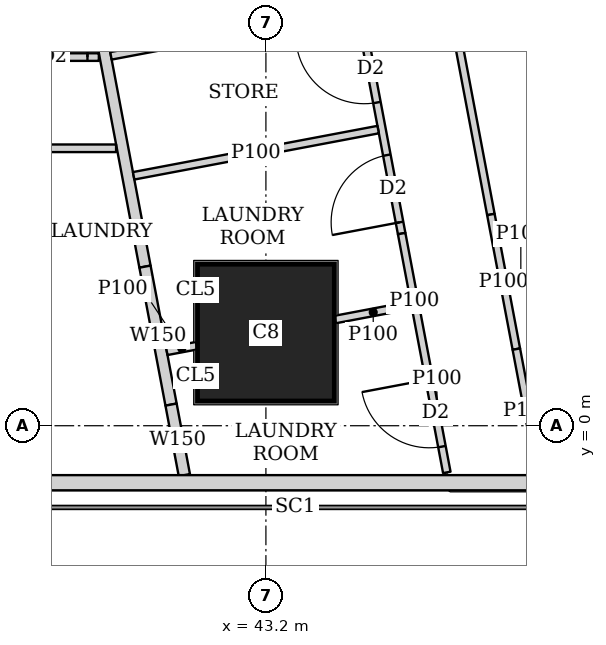
"""IFC4 building model, lengths in metres.
Left out: names, types, materials, properties, quantities, classifications, styles, units other than length and angle.
Written with IfcOpenShell. Run it as: python <this file> out.ifc"""

import sys

from ifc_helpers import new_model, si_unit, direction, frame, frame_2d, origin, origin_2d, place, context, subcontext, project, spatial, rectangle, extrude, element, fill, save


model = new_model("IFC4")
c1 = context("Model", 3, precision=1e-05, world=origin(), true_north=direction((0.0, 1.0)))
c2 = subcontext(c1, "Body", "Model", "MODEL_VIEW")
j1 = project(units=[si_unit("LENGTHUNIT", "METRE"), si_unit("PLANEANGLEUNIT", "RADIAN")], contexts=[c1])
p1 = place(None, origin())
s1 = spatial("IfcSite", under=j1, at=p1, CompositionType="ELEMENT")
p2 = place(p1, origin())
s2 = spatial("IfcBuilding", under=s1, at=p2, CompositionType="ELEMENT")
p3 = place(p2, frame((0.0, 0.0, 147.05)))
s3 = spatial("IfcBuildingStorey", under=s2, at=p3, CompositionType="ELEMENT", Elevation=147.05)
p4 = place(p3, frame((43.2, 1.225, 0.0), z_axis=(0.0, 0.0, 1.0), x_axis=(1.0, 0.0, 0.0)))
e1 = element("IfcColumn", 1, at=p4, inside=s3, PredefinedType="COLUMN", context=c2, shape_type="SweptSolid", body=[
    extrude(rectangle(XDim=1.8, YDim=1.8, at=origin_2d()), origin(), (0.0, 0.0, 1.0), 3.75),
])
p5 = place(p3, frame((2.163, -0.75, 0.0), z_axis=(0.0, 0.0, 1.0), x_axis=(1.0, 0.0, 0.0)))
e2 = element("IfcWall", 2, at=p5, inside=s3, PredefinedType="SOLIDWALL", context=c2, shape_type="SweptSolid", body=[
    extrude(rectangle(XDim=45.628, YDim=0.2, at=frame_2d((22.814, 0.0))), origin(), (0.0, 0.0, 1.0), 3.5),
])
p6 = place(p5, frame((9.537, 0.0, 0.9)))
e3 = element("IfcOpeningElement", 3, at=p6, cuts=e2, PredefinedType="OPENING", context=c2, shape_type="SweptSolid", body=[
    extrude(rectangle(XDim=1.8, YDim=1.5, at=frame_2d((0.9, 0.75))), frame((0.0, 0.11, 0.0), z_axis=(0.0, -1.0, 0.0), x_axis=(1.0, 0.0, 0.0)), (0.0, 0.0, 1.0), 0.22),
])
p7 = place(p5, frame((13.137, 0.0, 0.9)))
e4 = element("IfcOpeningElement", 4, at=p7, cuts=e2, PredefinedType="OPENING", context=c2, shape_type="SweptSolid", body=[
    extrude(rectangle(XDim=1.8, YDim=1.5, at=frame_2d((0.9, 0.75))), frame((0.0, 0.11, 0.0), z_axis=(0.0, -1.0, 0.0), x_axis=(1.0, 0.0, 0.0)), (0.0, 0.0, 1.0), 0.22),
])
p8 = place(p5, frame((16.737, 0.0, 0.9)))
e5 = element("IfcOpeningElement", 5, at=p8, cuts=e2, PredefinedType="OPENING", context=c2, shape_type="SweptSolid", body=[
    extrude(rectangle(XDim=1.8, YDim=1.5, at=frame_2d((0.9, 0.75))), frame((0.0, 0.11, 0.0), z_axis=(0.0, -1.0, 0.0), x_axis=(1.0, 0.0, 0.0)), (0.0, 0.0, 1.0), 0.22),
])
p9 = place(p5, frame((20.337, 0.0, 0.9)))
e6 = element("IfcOpeningElement", 6, at=p9, cuts=e2, PredefinedType="OPENING", context=c2, shape_type="SweptSolid", body=[
    extrude(rectangle(XDim=1.8, YDim=1.5, at=frame_2d((0.9, 0.75))), frame((0.0, 0.11, 0.0), z_axis=(0.0, -1.0, 0.0), x_axis=(1.0, 0.0, 0.0)), (0.0, 0.0, 1.0), 0.22),
])
p10 = place(p5, frame((23.937, 0.0, 0.9)))
e7 = element("IfcOpeningElement", 7, at=p10, cuts=e2, PredefinedType="OPENING", context=c2, shape_type="SweptSolid", body=[
    extrude(rectangle(XDim=1.8, YDim=1.5, at=frame_2d((0.9, 0.75))), frame((0.0, 0.11, 0.0), z_axis=(0.0, -1.0, 0.0), x_axis=(1.0, 0.0, 0.0)), (0.0, 0.0, 1.0), 0.22),
])
p11 = place(p5, frame((27.537, 0.0, 0.9)))
e8 = element("IfcOpeningElement", 8, at=p11, cuts=e2, PredefinedType="OPENING", context=c2, shape_type="SweptSolid", body=[
    extrude(rectangle(XDim=1.8, YDim=1.5, at=frame_2d((0.9, 0.75))), frame((0.0, 0.11, 0.0), z_axis=(0.0, -1.0, 0.0), x_axis=(1.0, 0.0, 0.0)), (0.0, 0.0, 1.0), 0.22),
])
p12 = place(p5, frame((31.137, 0.0, 0.9)))
e9 = element("IfcOpeningElement", 9, at=p12, cuts=e2, PredefinedType="OPENING", context=c2, shape_type="SweptSolid", body=[
    extrude(rectangle(XDim=1.8, YDim=1.5, at=frame_2d((0.9, 0.75))), frame((0.0, 0.11, 0.0), z_axis=(0.0, -1.0, 0.0), x_axis=(1.0, 0.0, 0.0)), (0.0, 0.0, 1.0), 0.22),
])
p13 = place(p5, frame((34.737, 0.0, 0.9)))
e10 = element("IfcOpeningElement", 10, at=p13, cuts=e2, PredefinedType="OPENING", context=c2, shape_type="SweptSolid", body=[
    extrude(rectangle(XDim=1.8, YDim=1.5, at=frame_2d((0.9, 0.75))), frame((0.0, 0.11, 0.0), z_axis=(0.0, -1.0, 0.0), x_axis=(1.0, 0.0, 0.0)), (0.0, 0.0, 1.0), 0.22),
])
p14 = place(p3, frame((50.653, 2.703, 0.0), z_axis=(0.0, 0.0, 1.0), x_axis=(-0.185612026696, 0.982623109613, 0.0)))
e11 = element("IfcWall", 11, at=p14, inside=s3, PredefinedType="SOLIDWALL", context=c2, shape_type="SweptSolid", body=[
    extrude(rectangle(XDim=41.393, YDim=0.2, at=frame_2d((20.697, 0.0))), origin(), (0.0, 0.0, 1.0), 3.5),
])
p15 = place(p14, frame((1.633, 0.0, 0.9)))
e12 = element("IfcOpeningElement", 12, at=p15, cuts=e11, PredefinedType="OPENING", context=c2, shape_type="SweptSolid", body=[
    extrude(rectangle(XDim=1.8, YDim=1.5, at=frame_2d((0.9, 0.75))), frame((0.0, 0.11, 0.0), z_axis=(0.0, -1.0, 0.0), x_axis=(1.0, 0.0, 0.0)), (0.0, 0.0, 1.0), 0.22),
])
p16 = place(p14, frame((6.032, 0.0, 0.9)))
e13 = element("IfcOpeningElement", 13, at=p16, cuts=e11, PredefinedType="OPENING", context=c2, shape_type="SweptSolid", body=[
    extrude(rectangle(XDim=1.8, YDim=1.5, at=frame_2d((0.9, 0.75))), frame((0.0, 0.11, 0.0), z_axis=(0.0, -1.0, 0.0), x_axis=(1.0, 0.0, 0.0)), (0.0, 0.0, 1.0), 0.22),
])
p17 = place(p14, frame((9.848, 0.0, 0.9)))
e14 = element("IfcOpeningElement", 14, at=p17, cuts=e11, PredefinedType="OPENING", context=c2, shape_type="SweptSolid", body=[
    extrude(rectangle(XDim=1.8, YDim=1.5, at=frame_2d((0.9, 0.75))), frame((0.0, 0.11, 0.0), z_axis=(0.0, -1.0, 0.0), x_axis=(1.0, 0.0, 0.0)), (0.0, 0.0, 1.0), 0.22),
])
p18 = place(p14, frame((13.664, 0.0, 0.9)))
e15 = element("IfcOpeningElement", 15, at=p18, cuts=e11, PredefinedType="OPENING", context=c2, shape_type="SweptSolid", body=[
    extrude(rectangle(XDim=1.8, YDim=1.5, at=frame_2d((0.9, 0.75))), frame((0.0, 0.11, 0.0), z_axis=(0.0, -1.0, 0.0), x_axis=(1.0, 0.0, 0.0)), (0.0, 0.0, 1.0), 0.22),
])
p19 = place(p14, frame((17.481, 0.0, 0.9)))
e16 = element("IfcOpeningElement", 16, at=p19, cuts=e11, PredefinedType="OPENING", context=c2, shape_type="SweptSolid", body=[
    extrude(rectangle(XDim=1.8, YDim=1.5, at=frame_2d((0.9, 0.75))), frame((0.0, 0.11, 0.0), z_axis=(0.0, -1.0, 0.0), x_axis=(1.0, 0.0, 0.0)), (0.0, 0.0, 1.0), 0.22),
])
p20 = place(p14, frame((21.297, 0.0, 0.9)))
e17 = element("IfcOpeningElement", 17, at=p20, cuts=e11, PredefinedType="OPENING", context=c2, shape_type="SweptSolid", body=[
    extrude(rectangle(XDim=1.8, YDim=1.5, at=frame_2d((0.9, 0.75))), frame((0.0, 0.11, 0.0), z_axis=(0.0, -1.0, 0.0), x_axis=(1.0, 0.0, 0.0)), (0.0, 0.0, 1.0), 0.22),
])
p21 = place(p14, frame((25.113, 0.0, 0.9)))
e18 = element("IfcOpeningElement", 18, at=p21, cuts=e11, PredefinedType="OPENING", context=c2, shape_type="SweptSolid", body=[
    extrude(rectangle(XDim=1.8, YDim=1.5, at=frame_2d((0.9, 0.75))), frame((0.0, 0.11, 0.0), z_axis=(0.0, -1.0, 0.0), x_axis=(1.0, 0.0, 0.0)), (0.0, 0.0, 1.0), 0.22),
])
p22 = place(p14, frame((28.93, 0.0, 0.9)))
e19 = element("IfcOpeningElement", 19, at=p22, cuts=e11, PredefinedType="OPENING", context=c2, shape_type="SweptSolid", body=[
    extrude(rectangle(XDim=1.8, YDim=1.5, at=frame_2d((0.9, 0.75))), frame((0.0, 0.11, 0.0), z_axis=(0.0, -1.0, 0.0), x_axis=(1.0, 0.0, 0.0)), (0.0, 0.0, 1.0), 0.22),
])
p23 = place(p14, frame((32.746, 0.0, 0.9)))
e20 = element("IfcOpeningElement", 20, at=p23, cuts=e11, PredefinedType="OPENING", context=c2, shape_type="SweptSolid", body=[
    extrude(rectangle(XDim=1.8, YDim=1.5, at=frame_2d((0.9, 0.75))), frame((0.0, 0.11, 0.0), z_axis=(0.0, -1.0, 0.0), x_axis=(1.0, 0.0, 0.0)), (0.0, 0.0, 1.0), 0.22),
])
p24 = place(p14, frame((36.481, 0.0, 0.9)))
e21 = element("IfcOpeningElement", 21, at=p24, cuts=e11, PredefinedType="OPENING", context=c2, shape_type="SweptSolid", body=[
    extrude(rectangle(XDim=1.8, YDim=1.5, at=frame_2d((0.9, 0.75))), frame((0.0, 0.11, 0.0), z_axis=(0.0, -1.0, 0.0), x_axis=(1.0, 0.0, 0.0)), (0.0, 0.0, 1.0), 0.22),
])
p25 = place(p3, frame((33.877, 43.029, 0.0), z_axis=(0.0, 0.0, 1.0), x_axis=(0.185596841028, -0.98262597798, 0.0)))
e22 = element("IfcWall", 22, at=p25, inside=s3, PredefinedType="SOLIDWALL", context=c2, shape_type="SweptSolid", body=[
    extrude(rectangle(XDim=41.66, YDim=0.15, at=frame_2d((20.83, 0.0))), origin(), (0.0, 0.0, 1.0), 2.5),
])
p26 = place(p25, frame((12.57, 0.0, 0.0)))
e23 = element("IfcOpeningElement", 23, at=p26, cuts=e22, PredefinedType="OPENING", context=c2, shape_type="SweptSolid", body=[
    extrude(rectangle(XDim=1.0, YDim=2.1, at=frame_2d((0.5, 1.05))), frame((0.0, 0.085, 0.0), z_axis=(0.0, -1.0, 0.0), x_axis=(1.0, 0.0, 0.0)), (0.0, 0.0, 1.0), 0.17),
])
p27 = place(p25, frame((16.386, 0.0, 0.0)))
e24 = element("IfcOpeningElement", 24, at=p27, cuts=e22, PredefinedType="OPENING", context=c2, shape_type="SweptSolid", body=[
    extrude(rectangle(XDim=1.0, YDim=2.1, at=frame_2d((0.5, 1.05))), frame((0.0, 0.085, 0.0), z_axis=(0.0, -1.0, 0.0), x_axis=(1.0, 0.0, 0.0)), (0.0, 0.0, 1.0), 0.17),
])
p28 = place(p25, frame((31.166, 0.0, 0.0)))
e25 = element("IfcOpeningElement", 25, at=p28, cuts=e22, PredefinedType="OPENING", context=c2, shape_type="SweptSolid", body=[
    extrude(rectangle(XDim=1.0, YDim=2.1, at=frame_2d((0.5, 1.05))), frame((0.0, 0.085, 0.0), z_axis=(0.0, -1.0, 0.0), x_axis=(1.0, 0.0, 0.0)), (0.0, 0.0, 1.0), 0.17),
])
p29 = place(p3, frame((41.609, 2.093, 0.0), z_axis=(0.0, 0.0, 1.0), x_axis=(0.185708872674, -0.982604811005, 0.0)))
e26 = element("IfcWall", 26, at=p29, inside=s3, PredefinedType="SOLIDWALL", context=c2, shape_type="SweptSolid", body=[
    extrude(rectangle(XDim=1.847, YDim=0.15, at=frame_2d((0.924, 0.0))), origin(), (0.0, 0.0, 1.0), 2.1),
])
p30 = place(p3, frame((41.952, 0.278, 0.0), z_axis=(0.0, 0.0, 1.0), x_axis=(0.185365466984, -0.982669651332, 0.0)))
e27 = element("IfcWall", 27, at=p30, inside=s3, PredefinedType="SOLIDWALL", context=c2, shape_type="SweptSolid", body=[
    extrude(rectangle(XDim=0.944, YDim=0.15, at=frame_2d((0.472, 0.0))), origin(), (0.0, 0.0, 1.0), 3.5),
])
p31 = place(p3, frame((41.229, 3.65, 0.0), z_axis=(0.0, 0.0, 1.0), x_axis=(-1.0, 0.0, 0.0)))
e28 = element("IfcWall", 28, at=p31, inside=s3, PredefinedType="PARTITIONING", context=c2, shape_type="SweptSolid", body=[
    extrude(rectangle(XDim=12.429, YDim=0.1, at=frame_2d((6.214, 0.0))), origin(), (0.0, 0.0, 1.0), 3.5),
])
p32 = place(p31, frame((11.329, 0.0, 0.0)))
e29 = element("IfcOpeningElement", 29, at=p32, cuts=e28, PredefinedType="OPENING", context=c2, shape_type="SweptSolid", body=[
    extrude(rectangle(XDim=0.9, YDim=2.1, at=frame_2d((0.45, 1.05))), frame((0.0, 0.06, 0.0), z_axis=(0.0, -1.0, 0.0), x_axis=(1.0, 0.0, 0.0)), (0.0, 0.0, 1.0), 0.12),
])
p33 = place(p31, frame((7.729, 0.0, 0.0)))
e30 = element("IfcOpeningElement", 30, at=p33, cuts=e28, PredefinedType="OPENING", context=c2, shape_type="SweptSolid", body=[
    extrude(rectangle(XDim=0.9, YDim=2.1, at=frame_2d((0.45, 1.05))), frame((0.0, 0.06, 0.0), z_axis=(0.0, -1.0, 0.0), x_axis=(1.0, 0.0, 0.0)), (0.0, 0.0, 1.0), 0.12),
])
p34 = place(p31, frame((4.129, 0.0, 0.0)))
e31 = element("IfcOpeningElement", 31, at=p34, cuts=e28, PredefinedType="OPENING", context=c2, shape_type="SweptSolid", body=[
    extrude(rectangle(XDim=0.9, YDim=2.1, at=frame_2d((0.45, 1.05))), frame((0.0, 0.06, 0.0), z_axis=(0.0, -1.0, 0.0), x_axis=(1.0, 0.0, 0.0)), (0.0, 0.0, 1.0), 0.12),
])
p35 = place(p3, frame((41.002, 4.85, 0.0), z_axis=(0.0, 0.0, 1.0), x_axis=(-1.0, 0.0, 0.0)))
e32 = element("IfcWall", 32, at=p35, inside=s3, PredefinedType="PARTITIONING", context=c2, shape_type="SweptSolid", body=[
    extrude(rectangle(XDim=12.202, YDim=0.1, at=frame_2d((6.101, 0.0))), origin(), (0.0, 0.0, 1.0), 3.5),
])
p36 = place(p35, frame((10.647, 0.0, 0.0)))
e33 = element("IfcOpeningElement", 33, at=p36, cuts=e32, PredefinedType="OPENING", context=c2, shape_type="SweptSolid", body=[
    extrude(rectangle(XDim=0.9, YDim=2.1, at=frame_2d((0.45, 1.05))), frame((0.0, 0.06, 0.0), z_axis=(0.0, -1.0, 0.0), x_axis=(1.0, 0.0, 0.0)), (0.0, 0.0, 1.0), 0.12),
])
p37 = place(p35, frame((7.352, 0.0, 0.0)))
e34 = element("IfcOpeningElement", 34, at=p37, cuts=e32, PredefinedType="OPENING", context=c2, shape_type="SweptSolid", body=[
    extrude(rectangle(XDim=0.9, YDim=2.1, at=frame_2d((0.45, 1.05))), frame((0.0, 0.06, 0.0), z_axis=(0.0, -1.0, 0.0), x_axis=(1.0, 0.0, 0.0)), (0.0, 0.0, 1.0), 0.12),
])
p38 = place(p35, frame((3.642, 0.0, 0.0)))
e35 = element("IfcOpeningElement", 35, at=p38, cuts=e32, PredefinedType="OPENING", context=c2, shape_type="SweptSolid", body=[
    extrude(rectangle(XDim=0.9, YDim=2.1, at=frame_2d((0.45, 1.05))), frame((0.0, 0.06, 0.0), z_axis=(0.0, -1.0, 0.0), x_axis=(1.0, 0.0, 0.0)), (0.0, 0.0, 1.0), 0.12),
])
p39 = place(p35, frame((0.15, 0.0, 0.0)))
e36 = element("IfcOpeningElement", 36, at=p39, cuts=e32, PredefinedType="OPENING", context=c2, shape_type="SweptSolid", body=[
    extrude(rectangle(XDim=0.9, YDim=2.1, at=frame_2d((0.45, 1.05))), frame((0.0, 0.06, 0.0), z_axis=(0.0, -1.0, 0.0), x_axis=(1.0, 0.0, 0.0)), (0.0, 0.0, 1.0), 0.12),
])
p40 = place(p35, frame((8.847, 0.0, 0.0)))
e37 = element("IfcOpeningElement", 37, at=p40, cuts=e32, PredefinedType="OPENING", context=c2, shape_type="SweptSolid", body=[
    extrude(rectangle(XDim=0.9, YDim=2.1, at=frame_2d((0.45, 1.05))), frame((0.0, 0.06, 0.0), z_axis=(0.0, -1.0, 0.0), x_axis=(1.0, 0.0, 0.0)), (0.0, 0.0, 1.0), 0.12),
])
p41 = place(p35, frame((5.552, 0.0, 0.0)))
e38 = element("IfcOpeningElement", 38, at=p41, cuts=e32, PredefinedType="OPENING", context=c2, shape_type="SweptSolid", body=[
    extrude(rectangle(XDim=0.9, YDim=2.1, at=frame_2d((0.45, 1.05))), frame((0.0, 0.06, 0.0), z_axis=(0.0, -1.0, 0.0), x_axis=(1.0, 0.0, 0.0)), (0.0, 0.0, 1.0), 0.12),
])
p42 = place(p35, frame((1.842, 0.0, 0.0)))
e39 = element("IfcOpeningElement", 39, at=p42, cuts=e32, PredefinedType="OPENING", context=c2, shape_type="SweptSolid", body=[
    extrude(rectangle(XDim=0.9, YDim=2.1, at=frame_2d((0.45, 1.05))), frame((0.0, 0.06, 0.0), z_axis=(0.0, -1.0, 0.0), x_axis=(1.0, 0.0, 0.0)), (0.0, 0.0, 1.0), 0.12),
])
p43 = place(p3, frame((44.727, 10.366, 0.0), z_axis=(0.0, 0.0, 1.0), x_axis=(0.185578957652, -0.982629355595, 0.0)))
e40 = element("IfcWall", 40, at=p43, inside=s3, PredefinedType="PARTITIONING", context=c2, shape_type="SweptSolid", body=[
    extrude(rectangle(XDim=7.721, YDim=0.1, at=frame_2d((3.86, 0.0))), origin(), (0.0, 0.0, 1.0), 3.5),
])
p44 = place(p43, frame((0.151, 0.0, 0.0)))
e41 = element("IfcOpeningElement", 41, at=p44, cuts=e40, PredefinedType="OPENING", context=c2, shape_type="SweptSolid", body=[
    extrude(rectangle(XDim=0.9, YDim=2.1, at=frame_2d((0.45, 1.05))), frame((0.0, 0.06, 0.0), z_axis=(0.0, -1.0, 0.0), x_axis=(1.0, 0.0, 0.0)), (0.0, 0.0, 1.0), 0.12),
])
p45 = place(p43, frame((3.806, 0.0, 0.0)))
e42 = element("IfcOpeningElement", 42, at=p45, cuts=e40, PredefinedType="OPENING", context=c2, shape_type="SweptSolid", body=[
    extrude(rectangle(XDim=0.9, YDim=2.1, at=frame_2d((0.45, 1.05))), frame((0.0, 0.06, 0.0), z_axis=(0.0, -1.0, 0.0), x_axis=(1.0, 0.0, 0.0)), (0.0, 0.0, 1.0), 0.12),
])
p46 = place(p3, frame((46.16, 2.779, 0.0), z_axis=(0.0, 0.0, 1.0), x_axis=(0.18597295662, -0.982554863306, 0.0)))
e43 = element("IfcWall", 43, at=p46, inside=s3, PredefinedType="PARTITIONING", context=c2, shape_type="SweptSolid", body=[
    extrude(rectangle(XDim=1.802, YDim=0.1, at=frame_2d((0.901, 0.0))), origin(), (0.0, 0.0, 1.0), 2.1),
])
p47 = place(p3, frame((46.495, 1.008, 0.0), z_axis=(0.0, 0.0, 1.0), x_axis=(0.185535059532, -0.982637645159, 0.0)))
e44 = element("IfcWall", 44, at=p47, inside=s3, PredefinedType="PARTITIONING", context=c2, shape_type="SweptSolid", body=[
    extrude(rectangle(XDim=1.644, YDim=0.1, at=frame_2d((0.822, 0.0))), origin(), (0.0, 0.0, 1.0), 3.5),
])
p48 = place(p3, frame((43.999, 7.755, 0.0), z_axis=(0.0, 0.0, 1.0), x_axis=(0.185565904578, -0.982631820703, 0.0)))
e45 = element("IfcWall", 45, at=p48, inside=s3, PredefinedType="PARTITIONING", context=c2, shape_type="SweptSolid", body=[
    extrude(rectangle(XDim=5.319, YDim=0.1, at=frame_2d((2.66, 0.0))), origin(), (0.0, 0.0, 1.0), 3.5),
])
p49 = place(p48, frame((1.0, 0.0, 0.0)))
e46 = element("IfcOpeningElement", 46, at=p49, cuts=e45, PredefinedType="OPENING", context=c2, shape_type="SweptSolid", body=[
    extrude(rectangle(XDim=0.9, YDim=2.1, at=frame_2d((0.45, 1.05))), frame((0.0, 0.06, 0.0), z_axis=(0.0, -1.0, 0.0), x_axis=(1.0, 0.0, 0.0)), (0.0, 0.0, 1.0), 0.12),
])
p50 = place(p48, frame((4.269, 0.0, 0.0)))
e47 = element("IfcOpeningElement", 47, at=p50, cuts=e45, PredefinedType="OPENING", context=c2, shape_type="SweptSolid", body=[
    extrude(rectangle(XDim=0.9, YDim=2.1, at=frame_2d((0.45, 1.05))), frame((0.0, 0.06, 0.0), z_axis=(0.0, -1.0, 0.0), x_axis=(1.0, 0.0, 0.0)), (0.0, 0.0, 1.0), 0.12),
])
p51 = place(p48, frame((2.665, 0.0, 0.0)))
e48 = element("IfcOpeningElement", 48, at=p51, cuts=e45, PredefinedType="OPENING", context=c2, shape_type="SweptSolid", body=[
    extrude(rectangle(XDim=0.9, YDim=2.1, at=frame_2d((0.45, 1.05))), frame((0.0, 0.06, 0.0), z_axis=(0.0, -1.0, 0.0), x_axis=(1.0, 0.0, 0.0)), (0.0, 0.0, 1.0), 0.12),
])
p52 = place(p3, frame((44.986, 2.528, 0.0), z_axis=(0.0, 0.0, 1.0), x_axis=(0.18584218627, -0.982579605835, 0.0)))
e49 = element("IfcWall", 49, at=p52, inside=s3, PredefinedType="PARTITIONING", context=c2, shape_type="SweptSolid", body=[
    extrude(rectangle(XDim=1.802, YDim=0.1, at=frame_2d((0.901, 0.0))), origin(), (0.0, 0.0, 1.0), 2.1),
])
p53 = place(p3, frame((45.321, 0.757, 0.0), z_axis=(0.0, 0.0, 1.0), x_axis=(0.185640562635, -0.982617718904, 0.0)))
e50 = element("IfcWall", 50, at=p53, inside=s3, PredefinedType="PARTITIONING", context=c2, shape_type="SweptSolid", body=[
    extrude(rectangle(XDim=1.395, YDim=0.1, at=frame_2d((0.698, 0.0))), origin(), (0.0, 0.0, 1.0), 3.5),
])
p54 = place(p53, frame((0.15, 0.0, 0.0)))
e51 = element("IfcOpeningElement", 51, at=p54, cuts=e50, PredefinedType="OPENING", context=c2, shape_type="SweptSolid", body=[
    extrude(rectangle(XDim=0.9, YDim=2.1, at=frame_2d((0.45, 1.05))), frame((0.0, 0.06, 0.0), z_axis=(0.0, -1.0, 0.0), x_axis=(1.0, 0.0, 0.0)), (0.0, 0.0, 1.0), 0.12),
])
p55 = place(p3, frame((46.738, 2.006, 0.0), z_axis=(0.0, 0.0, 1.0), x_axis=(-0.982820466874, -0.184564161994, 0.0)))
e52 = element("IfcWall", 52, at=p55, inside=s3, PredefinedType="PARTITIONING", context=c2, shape_type="SweptSolid", body=[
    extrude(rectangle(XDim=0.374, YDim=0.1, at=frame_2d((0.187, 0.0))), origin(), (0.0, 0.0, 1.0), 2.1),
])
p56 = place(p3, frame((45.114, 1.587, 0.0), z_axis=(0.0, 0.0, 1.0), x_axis=(-0.982567886437, -0.185904138047, 0.0)))
e53 = element("IfcWall", 53, at=p56, inside=s3, PredefinedType="PARTITIONING", context=c2, shape_type="SweptSolid", body=[
    extrude(rectangle(XDim=1.022, YDim=0.1, at=frame_2d((0.511, 0.0))), origin(), (0.0, 0.0, 1.0), 2.1),
])
p57 = place(p3, frame((42.29, 1.053, 0.0), z_axis=(0.0, 0.0, 1.0), x_axis=(-0.982830800147, -0.184509127909, 0.0)))
e54 = element("IfcWall", 54, at=p57, inside=s3, PredefinedType="PARTITIONING", context=c2, shape_type="SweptSolid", body=[
    extrude(rectangle(XDim=0.401, YDim=0.1, at=frame_2d((0.2, 0.0))), origin(), (0.0, 0.0, 1.0), 2.1),
])
p58 = place(p3, frame((44.677, 3.896, 0.0), z_axis=(0.0, 0.0, 1.0), x_axis=(-0.982610347627, -0.185679575441, 0.0)))
e55 = element("IfcWall", 55, at=p58, inside=s3, PredefinedType="PARTITIONING", context=c2, shape_type="SweptSolid", body=[
    extrude(rectangle(XDim=3.274, YDim=0.1, at=frame_2d((1.637, 0.0))), origin(), (0.0, 0.0, 1.0), 3.5),
])
p59 = place(p3, frame((44.379, 5.474, 0.0), z_axis=(0.0, 0.0, 1.0), x_axis=(-0.982607026909, -0.185697147715, 0.0)))
e56 = element("IfcWall", 56, at=p59, inside=s3, PredefinedType="PARTITIONING", context=c2, shape_type="SweptSolid", body=[
    extrude(rectangle(XDim=3.275, YDim=0.1, at=frame_2d((1.637, 0.0))), origin(), (0.0, 0.0, 1.0), 3.5),
])
p60 = place(p39, origin())
e57 = element("IfcDoor", 57, at=p60, inside=s3, OperationType="SINGLE_SWING_RIGHT", PredefinedType="DOOR", context=c2, shape_type="SweptSolid", body=[
    extrude(rectangle(XDim=0.9, YDim=2.1, at=frame_2d((0.45, 1.05))), frame((0.0, 0.025, 0.0), z_axis=(0.0, -1.0, 0.0), x_axis=(1.0, 0.0, 0.0)), (0.0, 0.0, 1.0), 0.05),
])
fill(e36, e57)
p61 = place(p50, origin())
e58 = element("IfcDoor", 58, at=p61, inside=s3, OperationType="SINGLE_SWING_LEFT", PredefinedType="DOOR", context=c2, shape_type="SweptSolid", body=[
    extrude(rectangle(XDim=0.9, YDim=2.1, at=frame_2d((0.45, 1.05))), frame((0.0, 0.025, 0.0), z_axis=(0.0, -1.0, 0.0), x_axis=(1.0, 0.0, 0.0)), (0.0, 0.0, 1.0), 0.05),
])
fill(e47, e58)
p62 = place(p54, origin())
e59 = element("IfcDoor", 59, at=p62, inside=s3, OperationType="SINGLE_SWING_RIGHT", PredefinedType="DOOR", context=c2, shape_type="SweptSolid", body=[
    extrude(rectangle(XDim=0.9, YDim=2.1, at=frame_2d((0.45, 1.05))), frame((0.0, 0.025, 0.0), z_axis=(0.0, -1.0, 0.0), x_axis=(1.0, 0.0, 0.0)), (0.0, 0.0, 1.0), 0.05),
])
fill(e51, e59)
p63 = place(p51, origin())
e60 = element("IfcDoor", 60, at=p63, inside=s3, OperationType="SINGLE_SWING_RIGHT", PredefinedType="DOOR", context=c2, shape_type="SweptSolid", body=[
    extrude(rectangle(XDim=0.9, YDim=2.1, at=frame_2d((0.45, 1.05))), frame((0.0, 0.025, 0.0), z_axis=(0.0, -1.0, 0.0), x_axis=(1.0, 0.0, 0.0)), (0.0, 0.0, 1.0), 0.05),
])
fill(e48, e60)
save(model, sys.argv[1])
